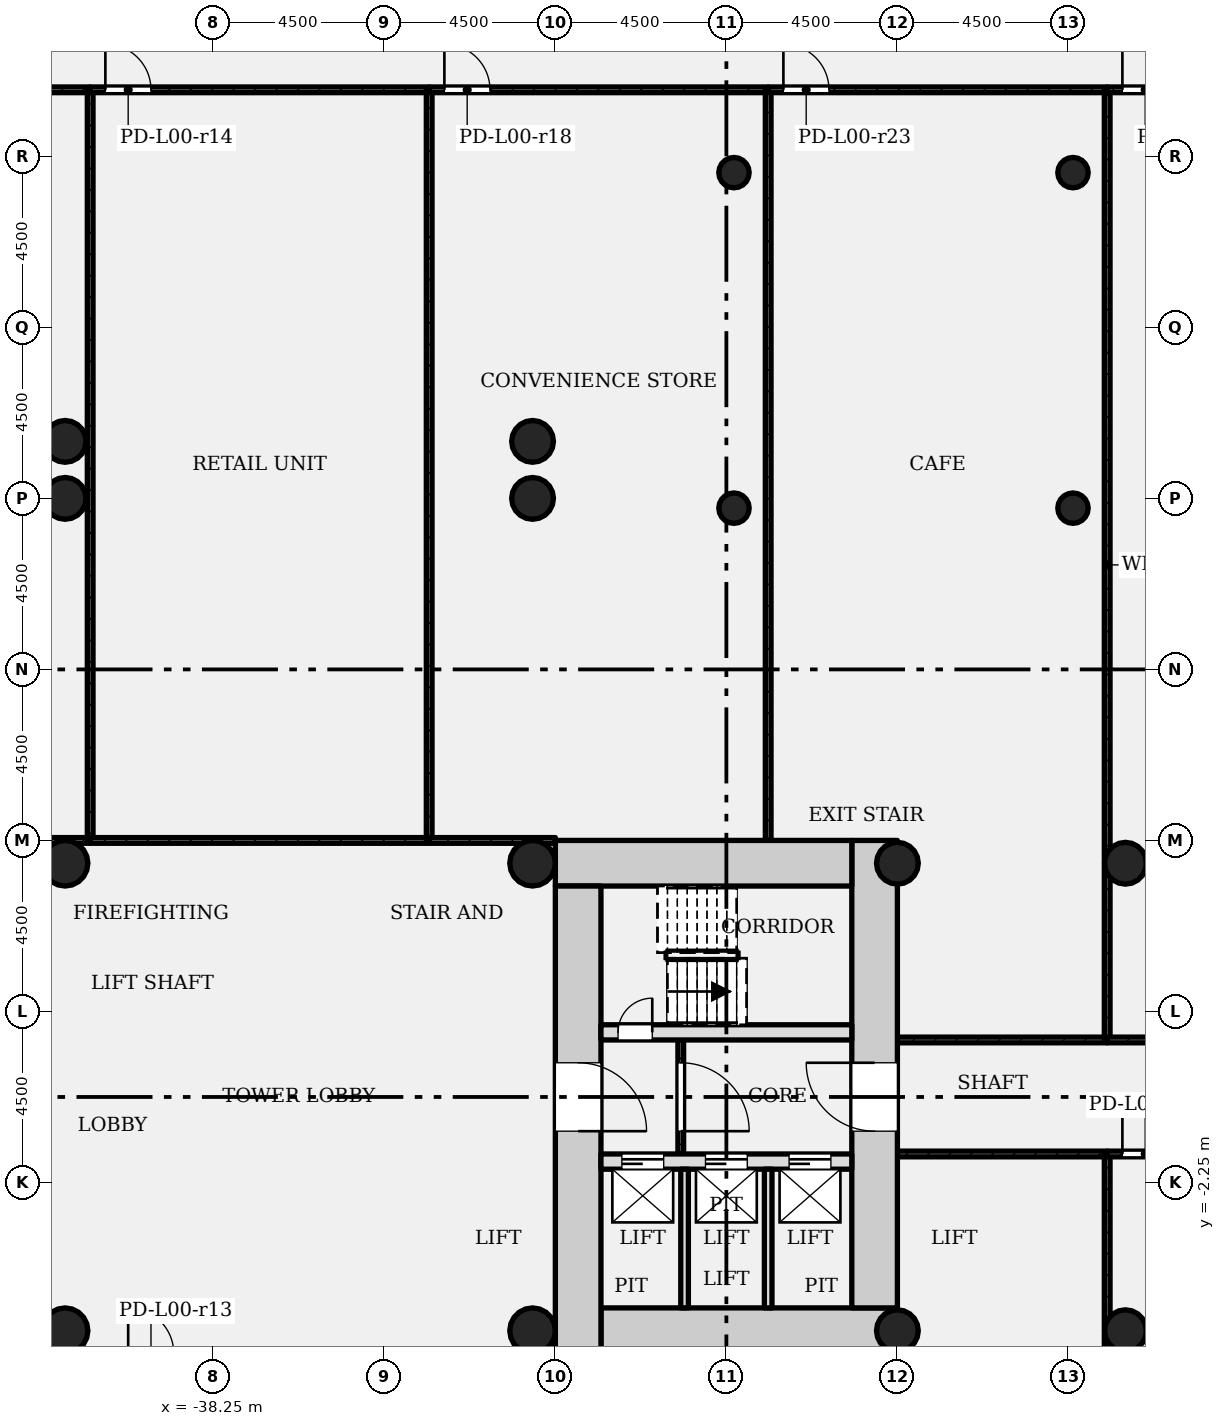
"""IFC4 building model, lengths in metres.
Left out: names, types, materials, properties, quantities, classifications, styles, units other than length and angle.
Written with IfcOpenShell. Run it as: python <this file> out.ifc"""

import sys

from ifc_helpers import new_model, si_unit, direction, frame, frame_2d, origin, origin_2d, place, context, subcontext, project, spatial, rectangle, hollow_circle, extrude, element, fill, save


model = new_model("IFC4")
c1 = context("Model", 3, precision=1e-05, world=origin(), true_north=direction((0.0, 1.0)))
c2 = subcontext(c1, "Body", "Model", "MODEL_VIEW")
j1 = project(units=[si_unit("LENGTHUNIT", "METRE"), si_unit("PLANEANGLEUNIT", "RADIAN")], contexts=[c1])
p1 = place(None, origin())
s1 = spatial("IfcSite", under=j1, at=p1, CompositionType="ELEMENT")
p2 = place(p1, origin())
s2 = spatial("IfcBuilding", under=s1, at=p2, CompositionType="ELEMENT")
p3 = place(p2, origin())
s3 = spatial("IfcBuildingStorey", under=s2, at=p3, CompositionType="ELEMENT", Elevation=0.0)
p4 = place(p3, frame((-28.05, -6.15, -0.4), z_axis=(0.0, 0.0, 1.0), x_axis=(1.0, 0.0, 0.0)))
e1 = element("IfcWall", 1, at=p4, inside=s3, PredefinedType="SHEAR", context=c2, shape_type="SweptSolid", body=[
    extrude(rectangle(XDim=7.8, YDim=1.2, at=frame_2d((3.9, 0.0))), origin(), (0.0, 0.0, 1.0), 6.4),
])
p5 = place(p3, frame((-20.85, -5.55, -0.4), z_axis=(0.0, 0.0, 1.0), x_axis=(0.0, 1.0, 0.0)))
e2 = element("IfcWall", 2, at=p5, inside=s3, PredefinedType="SHEAR", context=c2, shape_type="SweptSolid", body=[
    extrude(rectangle(XDim=12.3, YDim=1.2, at=frame_2d((6.15, 0.0))), origin(), (0.0, 0.0, 1.0), 6.4),
])
p6 = place(p5, frame((4.65, 0.0, 0.4)))
e3 = element("IfcOpeningElement", 3, at=p6, cuts=e2, PredefinedType="OPENING", context=c2, shape_type="SweptSolid", body=[
    extrude(rectangle(XDim=1.8, YDim=2.1, at=frame_2d((0.9, 1.05))), frame((0.0, 0.61, 0.0), z_axis=(0.0, -1.0, 0.0), x_axis=(1.0, 0.0, 0.0)), (0.0, 0.0, 1.0), 1.22),
])
p7 = place(p3, frame((-21.45, 6.15, -0.4), z_axis=(0.0, 0.0, 1.0), x_axis=(-1.0, 0.0, 0.0)))
e4 = element("IfcWall", 4, at=p7, inside=s3, PredefinedType="SHEAR", context=c2, shape_type="SweptSolid", body=[
    extrude(rectangle(XDim=7.8, YDim=1.2, at=frame_2d((3.9, 0.0))), origin(), (0.0, 0.0, 1.0), 6.4),
])
p8 = place(p3, frame((-28.65, 5.55, -0.4), z_axis=(0.0, 0.0, 1.0), x_axis=(0.0, -1.0, 0.0)))
e5 = element("IfcWall", 5, at=p8, inside=s3, PredefinedType="SHEAR", context=c2, shape_type="SweptSolid", body=[
    extrude(rectangle(XDim=12.3, YDim=1.2, at=frame_2d((6.15, 0.0))), origin(), (0.0, 0.0, 1.0), 6.4),
])
p9 = place(p8, frame((4.65, 0.0, 0.4)))
e6 = element("IfcOpeningElement", 6, at=p9, cuts=e5, PredefinedType="OPENING", context=c2, shape_type="SweptSolid", body=[
    extrude(rectangle(XDim=1.8, YDim=2.1, at=frame_2d((0.9, 1.05))), frame((0.0, 0.61, 0.0), z_axis=(0.0, -1.0, 0.0), x_axis=(1.0, 0.0, 0.0)), (0.0, 0.0, 1.0), 1.22),
])
p10 = place(p3, frame((-28.05, -1.7, -0.4), z_axis=(0.0, 0.0, 1.0), x_axis=(1.0, 0.0, 0.0)))
e7 = element("IfcWall", 7, at=p10, inside=s3, PredefinedType="SHEAR", context=c2, shape_type="SweptSolid", body=[
    extrude(rectangle(XDim=6.6, YDim=0.4, at=frame_2d((3.3, 0.0))), origin(), (0.0, 0.0, 1.0), 6.4),
])
p11 = place(p10, frame((0.55, 0.0, 0.4)))
e8 = element("IfcOpeningElement", 8, at=p11, cuts=e7, PredefinedType="OPENING", context=c2, shape_type="SweptSolid", body=[
    extrude(rectangle(XDim=1.1, YDim=2.1, at=frame_2d((0.55, 1.05))), frame((0.0, 0.21, 0.0), z_axis=(0.0, -1.0, 0.0), x_axis=(1.0, 0.0, 0.0)), (0.0, 0.0, 1.0), 0.42),
])
p12 = place(p10, frame((2.75, 0.0, 0.4)))
e9 = element("IfcOpeningElement", 9, at=p12, cuts=e7, PredefinedType="OPENING", context=c2, shape_type="SweptSolid", body=[
    extrude(rectangle(XDim=1.1, YDim=2.1, at=frame_2d((0.55, 1.05))), frame((0.0, 0.21, 0.0), z_axis=(0.0, -1.0, 0.0), x_axis=(1.0, 0.0, 0.0)), (0.0, 0.0, 1.0), 0.42),
])
p13 = place(p10, frame((4.95, 0.0, 0.4)))
e10 = element("IfcOpeningElement", 10, at=p13, cuts=e7, PredefinedType="OPENING", context=c2, shape_type="SweptSolid", body=[
    extrude(rectangle(XDim=1.1, YDim=2.1, at=frame_2d((0.55, 1.05))), frame((0.0, 0.21, 0.0), z_axis=(0.0, -1.0, 0.0), x_axis=(1.0, 0.0, 0.0)), (0.0, 0.0, 1.0), 0.42),
])
p14 = place(p3, frame((-28.05, 1.7, -0.4), z_axis=(0.0, 0.0, 1.0), x_axis=(1.0, 0.0, 0.0)))
e11 = element("IfcWall", 11, at=p14, inside=s3, PredefinedType="SHEAR", context=c2, shape_type="SweptSolid", body=[
    extrude(rectangle(XDim=6.6, YDim=0.4, at=frame_2d((3.3, 0.0))), origin(), (0.0, 0.0, 1.0), 6.4),
])
p15 = place(p14, frame((0.45, 0.0, 0.4)))
e12 = element("IfcOpeningElement", 12, at=p15, cuts=e11, PredefinedType="OPENING", context=c2, shape_type="SweptSolid", body=[
    extrude(rectangle(XDim=0.9, YDim=2.1, at=frame_2d((0.45, 1.05))), frame((0.0, 0.21, 0.0), z_axis=(0.0, -1.0, 0.0), x_axis=(1.0, 0.0, 0.0)), (0.0, 0.0, 1.0), 0.42),
])
for number, where, z_axis, x_axis in (
    (13, (-20.25, -6.15, -0.4), (0.0, 0.0, 1.0), (1.0, 0.0, 0.0)),
    (14, (-20.25, 6.15, -0.4), (0.0, 0.0, 1.0), (1.0, 0.0, 0.0)),
    (15, (-14.25, -6.15, -0.4), (0.0, 0.0, 1.0), (1.0, 0.0, 0.0)),
    (16, (-14.25, 6.15, -0.4), (0.0, 0.0, 1.0), (1.0, 0.0, 0.0)),
    (17, (-29.85, 15.75, -0.4), (0.0, 0.0, 1.0), (1.0, 0.0, 0.0)),
    (18, (-42.15, 15.75, -0.4), (0.0, 0.0, 1.0), (1.0, 0.0, 0.0)),
    (19, (-29.85, 17.25, -0.4), (0.0, 0.0, 1.0), (1.0, 0.0, 0.0)),
    (20, (-42.15, 17.25, -0.4), (0.0, 0.0, 1.0), (1.0, 0.0, 0.0)),
):
    element("IfcColumn", number, at=place(p3, frame(where, z_axis=z_axis, x_axis=x_axis)), inside=s3, PredefinedType="COLUMN", context=c2, shape_type="SweptSolid", body=[
        extrude(hollow_circle(Radius=0.55, WallThickness=0.04, at=origin_2d()), origin(), (0.0, 0.0, 1.0), 6.4),
    ])
for number, where, z_axis, x_axis in (
    (21, (-42.15, -6.15, -0.4), (0.0, 0.0, 1.0), (1.0, 0.0, 0.0)),
    (22, (-29.85, -6.15, -0.4), (0.0, 0.0, 1.0), (1.0, 0.0, 0.0)),
    (23, (-29.85, 6.15, -0.4), (0.0, 0.0, 1.0), (1.0, 0.0, 0.0)),
    (24, (-42.15, 6.15, -0.4), (0.0, 0.0, 1.0), (1.0, 0.0, 0.0)),
):
    element("IfcColumn", number, at=place(p3, frame(where, z_axis=z_axis, x_axis=x_axis)), inside=s3, PredefinedType="COLUMN", context=c2, shape_type="SweptSolid", body=[
        extrude(hollow_circle(Radius=0.6, WallThickness=0.045, at=origin_2d()), origin(), (0.0, 0.0, 1.0), 6.4),
    ])
for number, where, z_axis, x_axis in (
    (25, (-24.55, 15.493, -0.4), (0.0, 0.0, 1.0), (1.0, 0.0, 0.0)),
    (26, (-15.63, 15.493, -0.4), (0.0, 0.0, 1.0), (1.0, 0.0, 0.0)),
    (27, (-24.55, 24.321, -0.4), (0.0, 0.0, 1.0), (1.0, 0.0, 0.0)),
    (28, (-15.63, 24.321, -0.4), (0.0, 0.0, 1.0), (1.0, 0.0, 0.0)),
):
    element("IfcColumn", number, at=place(p3, frame(where, z_axis=z_axis, x_axis=x_axis)), inside=s3, PredefinedType="COLUMN", context=c2, shape_type="SweptSolid", body=[
        extrude(hollow_circle(Radius=0.4, WallThickness=0.028, at=origin_2d()), origin(), (0.0, 0.0, 1.0), 6.4),
    ])
p16 = place(p3, frame((-25.95, -1.5, 0.0), z_axis=(0.0, 0.0, 1.0), x_axis=(0.0, 1.0, 0.0)))
e29 = element("IfcWall", 29, at=p16, inside=s3, PredefinedType="PARTITIONING", context=c2, shape_type="SweptSolid", body=[
    extrude(rectangle(XDim=3.0, YDim=0.15, at=frame_2d((1.5, 0.0))), origin(), (0.0, 0.0, 1.0), 5.58),
])
p17 = place(p16, frame((0.6, 0.0, 0.0)))
e30 = element("IfcOpeningElement", 30, at=p17, cuts=e29, PredefinedType="OPENING", context=c2, shape_type="SweptSolid", body=[
    extrude(rectangle(XDim=1.8, YDim=2.1, at=frame_2d((0.9, 1.05))), frame((0.0, 0.085, 0.0), z_axis=(0.0, -1.0, 0.0), x_axis=(1.0, 0.0, 0.0)), (0.0, 0.0, 1.0), 0.17),
])
for number, where, z_axis, x_axis in (
    (31, (-25.85, -5.55, 0.0), (0.0, 0.0, 1.0), (0.0, 1.0, 0.0)),
    (32, (-23.65, -5.55, 0.0), (0.0, 0.0, 1.0), (0.0, 1.0, 0.0)),
):
    element("IfcWall", number, at=place(p3, frame(where, z_axis=z_axis, x_axis=x_axis)), inside=s3, PredefinedType="SOLIDWALL", context=c2, shape_type="SweptSolid", body=[
        extrude(rectangle(XDim=3.65, YDim=0.2, at=frame_2d((1.825, 0.0))), origin(), (0.0, 0.0, 1.0), 5.58),
    ])
p18 = place(p3, frame((-50.41, 26.5, 0.0), z_axis=(0.0, 0.0, 1.0), x_axis=(1.0, 0.0, 0.0)))
e33 = element("IfcWall", 33, at=p18, inside=s3, PredefinedType="PARTITIONING", context=c2, shape_type="SweptSolid", body=[
    extrude(rectangle(XDim=8.92, YDim=0.15, at=frame_2d((4.46, 0.0))), origin(), (0.0, 0.0, 1.0), 5.58),
])
p19 = place(p18, frame((0.4, 0.0, 0.0)))
e34 = element("IfcOpeningElement", 34, at=p19, cuts=e33, PredefinedType="OPENING", context=c2, shape_type="SweptSolid", body=[
    extrude(rectangle(XDim=1.2, YDim=2.1, at=frame_2d((0.6, 1.05))), frame((0.0, 0.085, 0.0), z_axis=(0.0, -1.0, 0.0), x_axis=(1.0, 0.0, 0.0)), (0.0, 0.0, 1.0), 0.17),
])
p20 = place(p3, frame((-41.49, 6.75, 0.0), z_axis=(0.0, 0.0, 1.0), x_axis=(-1.0, 0.0, 0.0)))
e35 = element("IfcWall", 35, at=p20, inside=s3, PredefinedType="PARTITIONING", context=c2, shape_type="SweptSolid", body=[
    extrude(rectangle(XDim=1.26, YDim=0.15, at=frame_2d((0.63, 0.0))), origin(), (0.0, 0.0, 1.0), 5.58),
])
p21 = place(p3, frame((-41.49, 26.5, 0.0), z_axis=(0.0, 0.0, 1.0), x_axis=(0.0, -1.0, 0.0)))
e36 = element("IfcWall", 36, at=p21, inside=s3, PredefinedType="PARTITIONING", context=c2, shape_type="SweptSolid", body=[
    extrude(rectangle(XDim=19.75, YDim=0.15, at=frame_2d((9.875, 0.0))), origin(), (0.0, 0.0, 1.0), 5.58),
])
p22 = place(p3, frame((-41.49, 26.5, 0.0), z_axis=(0.0, 0.0, 1.0), x_axis=(1.0, 0.0, 0.0)))
e37 = element("IfcWall", 37, at=p22, inside=s3, PredefinedType="PARTITIONING", context=c2, shape_type="SweptSolid", body=[
    extrude(rectangle(XDim=8.92, YDim=0.15, at=frame_2d((4.46, 0.0))), origin(), (0.0, 0.0, 1.0), 5.58),
])
p23 = place(p22, frame((0.4, 0.0, 0.0)))
e38 = element("IfcOpeningElement", 38, at=p23, cuts=e37, PredefinedType="OPENING", context=c2, shape_type="SweptSolid", body=[
    extrude(rectangle(XDim=1.2, YDim=2.1, at=frame_2d((0.6, 1.05))), frame((0.0, 0.085, 0.0), z_axis=(0.0, -1.0, 0.0), x_axis=(1.0, 0.0, 0.0)), (0.0, 0.0, 1.0), 0.17),
])
p24 = place(p3, frame((-32.57, 6.75, 0.0), z_axis=(0.0, 0.0, 1.0), x_axis=(-1.0, 0.0, 0.0)))
e39 = element("IfcWall", 39, at=p24, inside=s3, PredefinedType="PARTITIONING", context=c2, shape_type="SweptSolid", body=[
    extrude(rectangle(XDim=8.92, YDim=0.15, at=frame_2d((4.46, 0.0))), origin(), (0.0, 0.0, 1.0), 5.58),
])
p25 = place(p3, frame((-32.57, 26.5, 0.0), z_axis=(0.0, 0.0, 1.0), x_axis=(0.0, -1.0, 0.0)))
e40 = element("IfcWall", 40, at=p25, inside=s3, PredefinedType="PARTITIONING", context=c2, shape_type="SweptSolid", body=[
    extrude(rectangle(XDim=19.75, YDim=0.15, at=frame_2d((9.875, 0.0))), origin(), (0.0, 0.0, 1.0), 5.58),
])
p26 = place(p3, frame((-29.25, 6.75, 0.0), z_axis=(0.0, 0.0, 1.0), x_axis=(-1.0, 0.0, 0.0)))
e41 = element("IfcWall", 41, at=p26, inside=s3, PredefinedType="PARTITIONING", context=c2, shape_type="SweptSolid", body=[
    extrude(rectangle(XDim=3.32, YDim=0.15, at=frame_2d((1.66, 0.0))), origin(), (0.0, 0.0, 1.0), 5.58),
])
p27 = place(p3, frame((-32.57, 26.5, 0.0), z_axis=(0.0, 0.0, 1.0), x_axis=(1.0, 0.0, 0.0)))
e42 = element("IfcWall", 42, at=p27, inside=s3, PredefinedType="PARTITIONING", context=c2, shape_type="SweptSolid", body=[
    extrude(rectangle(XDim=8.92, YDim=0.15, at=frame_2d((4.46, 0.0))), origin(), (0.0, 0.0, 1.0), 5.58),
])
p28 = place(p27, frame((0.4, 0.0, 0.0)))
e43 = element("IfcOpeningElement", 43, at=p28, cuts=e42, PredefinedType="OPENING", context=c2, shape_type="SweptSolid", body=[
    extrude(rectangle(XDim=1.2, YDim=2.1, at=frame_2d((0.6, 1.05))), frame((0.0, 0.085, 0.0), z_axis=(0.0, -1.0, 0.0), x_axis=(1.0, 0.0, 0.0)), (0.0, 0.0, 1.0), 0.17),
])
p29 = place(p3, frame((-23.65, 26.5, 0.0), z_axis=(0.0, 0.0, 1.0), x_axis=(0.0, -1.0, 0.0)))
e44 = element("IfcWall", 44, at=p29, inside=s3, PredefinedType="PARTITIONING", context=c2, shape_type="SweptSolid", body=[
    extrude(rectangle(XDim=19.75, YDim=0.15, at=frame_2d((9.875, 0.0))), origin(), (0.0, 0.0, 1.0), 5.58),
])
p30 = place(p3, frame((-20.25, -1.5, 0.0), z_axis=(0.0, 0.0, 1.0), x_axis=(1.0, 0.0, 0.0)))
e45 = element("IfcWall", 45, at=p30, inside=s3, PredefinedType="PARTITIONING", context=c2, shape_type="SweptSolid", body=[
    extrude(rectangle(XDim=5.52, YDim=0.15, at=frame_2d((2.76, 0.0))), origin(), (0.0, 0.0, 1.0), 5.58),
])
p31 = place(p3, frame((-14.73, -1.5, 0.0), z_axis=(0.0, 0.0, 1.0), x_axis=(0.0, -1.0, 0.0)))
e46 = element("IfcWall", 46, at=p31, inside=s3, PredefinedType="PARTITIONING", context=c2, shape_type="SweptSolid", body=[
    extrude(rectangle(XDim=22.0, YDim=0.15, at=frame_2d((11.0, 0.0))), origin(), (0.0, 0.0, 1.0), 5.58),
])
p32 = place(p3, frame((-23.65, 26.5, 0.0), z_axis=(0.0, 0.0, 1.0), x_axis=(1.0, 0.0, 0.0)))
e47 = element("IfcWall", 47, at=p32, inside=s3, PredefinedType="PARTITIONING", context=c2, shape_type="SweptSolid", body=[
    extrude(rectangle(XDim=8.92, YDim=0.15, at=frame_2d((4.46, 0.0))), origin(), (0.0, 0.0, 1.0), 5.58),
])
p33 = place(p32, frame((0.4, 0.0, 0.0)))
e48 = element("IfcOpeningElement", 48, at=p33, cuts=e47, PredefinedType="OPENING", context=c2, shape_type="SweptSolid", body=[
    extrude(rectangle(XDim=1.2, YDim=2.1, at=frame_2d((0.6, 1.05))), frame((0.0, 0.085, 0.0), z_axis=(0.0, -1.0, 0.0), x_axis=(1.0, 0.0, 0.0)), (0.0, 0.0, 1.0), 0.17),
])
p34 = place(p3, frame((-14.73, 1.5, 0.0), z_axis=(0.0, 0.0, 1.0), x_axis=(-1.0, 0.0, 0.0)))
e49 = element("IfcWall", 49, at=p34, inside=s3, PredefinedType="PARTITIONING", context=c2, shape_type="SweptSolid", body=[
    extrude(rectangle(XDim=5.52, YDim=0.15, at=frame_2d((2.76, 0.0))), origin(), (0.0, 0.0, 1.0), 5.58),
])
p35 = place(p3, frame((-14.73, 26.5, 0.0), z_axis=(0.0, 0.0, 1.0), x_axis=(0.0, -1.0, 0.0)))
e50 = element("IfcWall", 50, at=p35, inside=s3, PredefinedType="PARTITIONING", context=c2, shape_type="SweptSolid", body=[
    extrude(rectangle(XDim=25.0, YDim=0.15, at=frame_2d((12.5, 0.0))), origin(), (0.0, 0.0, 1.0), 5.58),
])
p36 = place(p3, frame((-14.73, -1.5, 0.0), z_axis=(0.0, 0.0, 1.0), x_axis=(1.0, 0.0, 0.0)))
e51 = element("IfcWall", 51, at=p36, inside=s3, PredefinedType="PARTITIONING", context=c2, shape_type="SweptSolid", body=[
    extrude(rectangle(XDim=8.92, YDim=0.15, at=frame_2d((4.46, 0.0))), origin(), (0.0, 0.0, 1.0), 5.58),
])
p37 = place(p36, frame((0.4, 0.0, 0.0)))
e52 = element("IfcOpeningElement", 52, at=p37, cuts=e51, PredefinedType="OPENING", context=c2, shape_type="SweptSolid", body=[
    extrude(rectangle(XDim=1.2, YDim=2.1, at=frame_2d((0.6, 1.05))), frame((0.0, 0.085, 0.0), z_axis=(0.0, -1.0, 0.0), x_axis=(1.0, 0.0, 0.0)), (0.0, 0.0, 1.0), 0.17),
])
p38 = place(p3, frame((-14.73, 26.5, 0.0), z_axis=(0.0, 0.0, 1.0), x_axis=(1.0, 0.0, 0.0)))
e53 = element("IfcWall", 53, at=p38, inside=s3, PredefinedType="PARTITIONING", context=c2, shape_type="SweptSolid", body=[
    extrude(rectangle(XDim=8.92, YDim=0.15, at=frame_2d((4.46, 0.0))), origin(), (0.0, 0.0, 1.0), 5.58),
])
p39 = place(p38, frame((0.4, 0.0, 0.0)))
e54 = element("IfcOpeningElement", 54, at=p39, cuts=e53, PredefinedType="OPENING", context=c2, shape_type="SweptSolid", body=[
    extrude(rectangle(XDim=1.2, YDim=2.1, at=frame_2d((0.6, 1.05))), frame((0.0, 0.085, 0.0), z_axis=(0.0, -1.0, 0.0), x_axis=(1.0, 0.0, 0.0)), (0.0, 0.0, 1.0), 0.17),
])
p40 = place(p3, frame((-5.81, 1.5, 0.0), z_axis=(0.0, 0.0, 1.0), x_axis=(-1.0, 0.0, 0.0)))
e55 = element("IfcWall", 55, at=p40, inside=s3, PredefinedType="PARTITIONING", context=c2, shape_type="SweptSolid", body=[
    extrude(rectangle(XDim=8.92, YDim=0.15, at=frame_2d((4.46, 0.0))), origin(), (0.0, 0.0, 1.0), 5.58),
])
p41 = place(p17, origin())
e56 = element("IfcDoor", 56, at=p41, inside=s3, OperationType="SINGLE_SWING_LEFT", PredefinedType="DOOR", context=c2, shape_type="SweptSolid", body=[
    extrude(rectangle(XDim=1.8, YDim=2.1, at=frame_2d((0.9, 1.05))), frame((0.0, 0.025, 0.0), z_axis=(0.0, -1.0, 0.0), x_axis=(1.0, 0.0, 0.0)), (0.0, 0.0, 1.0), 0.05),
])
fill(e30, e56)
p42 = place(p23, origin())
e57 = element("IfcDoor", 57, at=p42, inside=s3, OperationType="SINGLE_SWING_RIGHT", PredefinedType="DOOR", context=c2, shape_type="SweptSolid", body=[
    extrude(rectangle(XDim=1.2, YDim=2.1, at=frame_2d((0.6, 1.05))), frame((0.0, 0.025, 0.0), z_axis=(0.0, -1.0, 0.0), x_axis=(1.0, 0.0, 0.0)), (0.0, 0.0, 1.0), 0.05),
])
fill(e38, e57)
p43 = place(p28, origin())
e58 = element("IfcDoor", 58, at=p43, inside=s3, OperationType="SINGLE_SWING_RIGHT", PredefinedType="DOOR", context=c2, shape_type="SweptSolid", body=[
    extrude(rectangle(XDim=1.2, YDim=2.1, at=frame_2d((0.6, 1.05))), frame((0.0, 0.025, 0.0), z_axis=(0.0, -1.0, 0.0), x_axis=(1.0, 0.0, 0.0)), (0.0, 0.0, 1.0), 0.05),
])
fill(e43, e58)
p44 = place(p33, origin())
e59 = element("IfcDoor", 59, at=p44, inside=s3, OperationType="SINGLE_SWING_RIGHT", PredefinedType="DOOR", context=c2, shape_type="SweptSolid", body=[
    extrude(rectangle(XDim=1.2, YDim=2.1, at=frame_2d((0.6, 1.05))), frame((0.0, 0.025, 0.0), z_axis=(0.0, -1.0, 0.0), x_axis=(1.0, 0.0, 0.0)), (0.0, 0.0, 1.0), 0.05),
])
fill(e48, e59)
p45 = place(p37, origin())
e60 = element("IfcDoor", 60, at=p45, inside=s3, OperationType="SINGLE_SWING_RIGHT", PredefinedType="DOOR", context=c2, shape_type="SweptSolid", body=[
    extrude(rectangle(XDim=1.2, YDim=2.1, at=frame_2d((0.6, 1.05))), frame((0.0, 0.025, 0.0), z_axis=(0.0, -1.0, 0.0), x_axis=(1.0, 0.0, 0.0)), (0.0, 0.0, 1.0), 0.05),
])
fill(e52, e60)
p46 = place(p39, origin())
e61 = element("IfcDoor", 61, at=p46, inside=s3, OperationType="SINGLE_SWING_RIGHT", PredefinedType="DOOR", context=c2, shape_type="SweptSolid", body=[
    extrude(rectangle(XDim=1.2, YDim=2.1, at=frame_2d((0.6, 1.05))), frame((0.0, 0.025, 0.0), z_axis=(0.0, -1.0, 0.0), x_axis=(1.0, 0.0, 0.0)), (0.0, 0.0, 1.0), 0.05),
])
fill(e54, e61)
p47 = place(p15, origin())
e62 = element("IfcDoor", 62, at=p47, inside=s3, OperationType="SINGLE_SWING_LEFT", PredefinedType="DOOR", context=c2, shape_type="SweptSolid", body=[
    extrude(rectangle(XDim=0.9, YDim=2.1, at=frame_2d((0.45, 1.05))), frame((0.0, 0.025, 0.0), z_axis=(0.0, -1.0, 0.0), x_axis=(1.0, 0.0, 0.0)), (0.0, 0.0, 1.0), 0.05),
])
fill(e12, e62)
p48 = place(p11, origin())
e63 = element("IfcDoor", 63, at=p48, inside=s3, OperationType="SLIDING_TO_LEFT", PredefinedType="DOOR", context=c2, shape_type="SweptSolid", body=[
    extrude(rectangle(XDim=1.1, YDim=2.1, at=frame_2d((0.55, 1.05))), frame((0.0, 0.025, 0.0), z_axis=(0.0, -1.0, 0.0), x_axis=(1.0, 0.0, 0.0)), (0.0, 0.0, 1.0), 0.05),
])
fill(e8, e63)
p49 = place(p12, origin())
e64 = element("IfcDoor", 64, at=p49, inside=s3, OperationType="SLIDING_TO_LEFT", PredefinedType="DOOR", context=c2, shape_type="SweptSolid", body=[
    extrude(rectangle(XDim=1.1, YDim=2.1, at=frame_2d((0.55, 1.05))), frame((0.0, 0.025, 0.0), z_axis=(0.0, -1.0, 0.0), x_axis=(1.0, 0.0, 0.0)), (0.0, 0.0, 1.0), 0.05),
])
fill(e9, e64)
p50 = place(p13, origin())
e65 = element("IfcDoor", 65, at=p50, inside=s3, OperationType="SLIDING_TO_LEFT", PredefinedType="DOOR", context=c2, shape_type="SweptSolid", body=[
    extrude(rectangle(XDim=1.1, YDim=2.1, at=frame_2d((0.55, 1.05))), frame((0.0, 0.025, 0.0), z_axis=(0.0, -1.0, 0.0), x_axis=(1.0, 0.0, 0.0)), (0.0, 0.0, 1.0), 0.05),
])
fill(e10, e65)
p51 = place(p9, origin())
e66 = element("IfcDoor", 66, at=p51, inside=s3, OperationType="SINGLE_SWING_LEFT", PredefinedType="DOOR", context=c2, shape_type="SweptSolid", body=[
    extrude(rectangle(XDim=1.8, YDim=2.1, at=frame_2d((0.9, 1.05))), frame((0.0, 0.025, 0.0), z_axis=(0.0, -1.0, 0.0), x_axis=(1.0, 0.0, 0.0)), (0.0, 0.0, 1.0), 0.05),
])
fill(e6, e66)
p52 = place(p6, origin())
e67 = element("IfcDoor", 67, at=p52, inside=s3, OperationType="SINGLE_SWING_LEFT", PredefinedType="DOOR", context=c2, shape_type="SweptSolid", body=[
    extrude(rectangle(XDim=1.8, YDim=2.1, at=frame_2d((0.9, 1.05))), frame((0.0, 0.025, 0.0), z_axis=(0.0, -1.0, 0.0), x_axis=(1.0, 0.0, 0.0)), (0.0, 0.0, 1.0), 0.05),
])
fill(e3, e67)
save(model, sys.argv[1])
